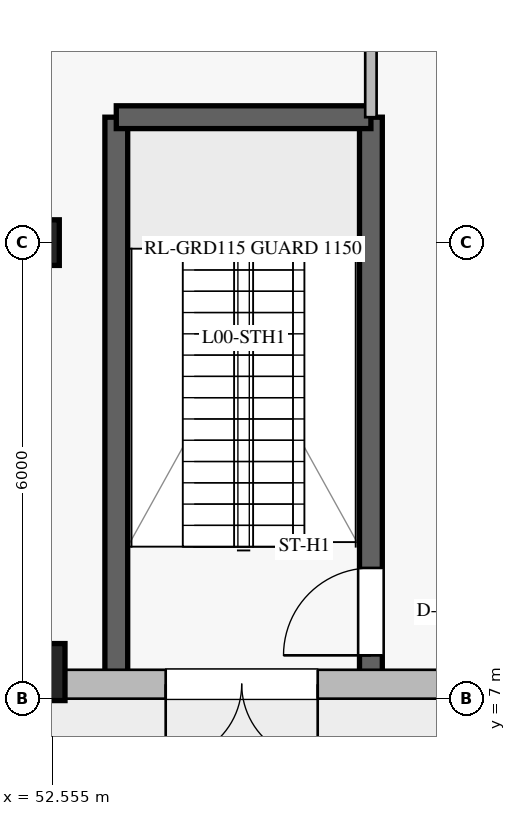
"""IFC4 building model, lengths in metres.
Left out: names, types, materials, properties, quantities, classifications, styles, units other than length and angle.
Written with IfcOpenShell. Run it as: python <this file> out.ifc"""

import sys

from ifc_helpers import new_model, si_unit, direction, frame, frame_2d, origin, origin_2d, place, context, subcontext, project, spatial, rectangle, extrude, element, fill, save


model = new_model("IFC4")
c1 = context("Model", 3, precision=1e-05, world=origin(), true_north=direction((0.0, 1.0)))
c2 = subcontext(c1, "Body", "Model", "MODEL_VIEW")
j1 = project(units=[si_unit("LENGTHUNIT", "METRE"), si_unit("PLANEANGLEUNIT", "RADIAN")], contexts=[c1])
p1 = place(None, origin())
s1 = spatial("IfcSite", under=j1, at=p1, CompositionType="ELEMENT")
p2 = place(p1, origin())
s2 = spatial("IfcBuilding", under=s1, at=p2, CompositionType="ELEMENT")
p3 = place(p2, origin())
s3 = spatial("IfcBuildingStorey", under=s2, at=p3, CompositionType="ELEMENT", Elevation=0.0)
p4 = place(p3, frame((56.75, 7.35, 0.0), z_axis=(0.0, 0.0, 1.0), x_axis=(0.0, 1.0, 0.0)))
e1 = element("IfcWall", 1, at=p4, inside=s3, PredefinedType="SOLIDWALL", context=c2, shape_type="SweptSolid", body=[
    extrude(rectangle(XDim=7.3, YDim=0.3, at=frame_2d((3.65, 0.0))), origin(), (0.0, 0.0, 1.0), 4.94),
])
p5 = place(p4, frame((0.22, 0.0, 0.0)))
e2 = element("IfcOpeningElement", 2, at=p5, cuts=e1, PredefinedType="OPENING", context=c2, shape_type="SweptSolid", body=[
    extrude(rectangle(XDim=1.15, YDim=2.2, at=frame_2d((0.575, 1.1))), frame((0.0, 0.16, 0.0), z_axis=(0.0, -1.0, 0.0), x_axis=(1.0, 0.0, 0.0)), (0.0, 0.0, 1.0), 0.32),
])
p6 = place(p3, frame((53.4, 7.35, 0.0), z_axis=(0.0, 0.0, 1.0), x_axis=(0.0, 1.0, 0.0)))
e3 = element("IfcWall", 3, at=p6, inside=s3, PredefinedType="SOLIDWALL", context=c2, shape_type="SweptSolid", body=[
    extrude(rectangle(XDim=7.3, YDim=0.3, at=frame_2d((3.65, 0.0))), origin(), (0.0, 0.0, 1.0), 4.94),
])
p7 = place(p3, frame((53.4, 14.65, 0.0), z_axis=(0.0, 0.0, 1.0), x_axis=(1.0, 0.0, 0.0)))
e4 = element("IfcWall", 4, at=p7, inside=s3, PredefinedType="SOLIDWALL", context=c2, shape_type="SweptSolid", body=[
    extrude(rectangle(XDim=3.35, YDim=0.3, at=frame_2d((1.675, 0.0))), origin(), (0.0, 0.0, 1.0), 4.94),
])
p8 = place(p3, frame((52.35, 7.35, 0.0), z_axis=(0.0, 0.0, 1.0), x_axis=(1.0, 0.0, 0.0)))
e5 = element("IfcColumn", 5, at=p8, inside=s3, PredefinedType="COLUMN", context=c2, shape_type="SweptSolid", body=[
    extrude(rectangle(XDim=0.75, YDim=0.75, at=origin_2d()), origin(), (0.0, 0.0, 1.0), 5.2),
])
p9 = place(p3, frame((52.35, 13.0, 0.0), z_axis=(0.0, 0.0, 1.0), x_axis=(1.0, 0.0, 0.0)))
e6 = element("IfcColumn", 6, at=p9, inside=s3, PredefinedType="COLUMN", context=c2, shape_type="SweptSolid", body=[
    extrude(rectangle(XDim=0.6, YDim=0.6, at=origin_2d()), origin(), (0.0, 0.0, 1.0), 5.2),
])
p10 = place(p3, frame((75.0, 7.19, 0.0), z_axis=(0.0, 0.0, 1.0), x_axis=(-1.0, 0.0, 0.0)))
e7 = element("IfcWall", 7, at=p10, inside=s3, PredefinedType="STANDARD", context=c2, shape_type="SweptSolid", body=[
    extrude(rectangle(XDim=23.0, YDim=0.38, at=frame_2d((11.5, 0.0))), origin(), (0.0, 0.0, 1.0), 4.94),
])
p11 = place(p10, frame((18.95, 0.0, 0.0)))
e8 = element("IfcOpeningElement", 8, at=p11, cuts=e7, PredefinedType="OPENING", context=c2, shape_type="SweptSolid", body=[
    extrude(rectangle(XDim=2.0, YDim=2.4, at=frame_2d((1.0, 1.2))), frame((0.0, 0.2, 0.0), z_axis=(0.0, -1.0, 0.0), x_axis=(1.0, 0.0, 0.0)), (0.0, 0.0, 1.0), 0.4),
])
p12 = place(p10, frame((10.3, 0.0, 0.95)))
e9 = element("IfcOpeningElement", 9, at=p12, cuts=e7, PredefinedType="OPENING", context=c2, shape_type="SweptSolid", body=[
    extrude(rectangle(XDim=2.4, YDim=1.8, at=frame_2d((1.2, 0.9))), frame((0.0, 0.2, 0.0), z_axis=(0.0, -1.0, 0.0), x_axis=(1.0, 0.0, 0.0)), (0.0, 0.0, 1.0), 0.4),
])
p13 = place(p3, frame((56.75, 14.65, 0.0), z_axis=(0.0, 0.0, 1.0), x_axis=(0.0, 1.0, 0.0)))
e10 = element("IfcWall", 10, at=p13, inside=s3, PredefinedType="PARTITIONING", context=c2, shape_type="SweptSolid", body=[
    extrude(rectangle(XDim=20.7, YDim=0.15, at=frame_2d((10.35, 0.0))), origin(), (0.0, 0.0, 1.0), 4.94),
])
p14 = place(p13, frame((9.675, 0.0, 0.0)))
e11 = element("IfcOpeningElement", 11, at=p14, cuts=e10, PredefinedType="OPENING", context=c2, shape_type="SweptSolid", body=[
    extrude(rectangle(XDim=1.35, YDim=2.2, at=frame_2d((0.675, 1.1))), frame((0.0, 0.085, 0.0), z_axis=(0.0, -1.0, 0.0), x_axis=(1.0, 0.0, 0.0)), (0.0, 0.0, 1.0), 0.17),
])
p15 = place(p11, origin())
e12 = element("IfcDoor", 12, at=p15, inside=s3, OperationType="DOUBLE_DOOR_SINGLE_SWING", PredefinedType="DOOR", context=c2, shape_type="SweptSolid", body=[
    extrude(rectangle(XDim=2.0, YDim=2.4, at=frame_2d((1.0, 1.2))), frame((0.0, 0.025, 0.0), z_axis=(0.0, -1.0, 0.0), x_axis=(1.0, 0.0, 0.0)), (0.0, 0.0, 1.0), 0.05),
])
fill(e8, e12)
p16 = place(p5, origin())
e13 = element("IfcDoor", 13, at=p16, inside=s3, OperationType="SINGLE_SWING_LEFT", PredefinedType="DOOR", context=c2, shape_type="SweptSolid", body=[
    extrude(rectangle(XDim=1.15, YDim=2.2, at=frame_2d((0.575, 1.1))), frame((0.0, 0.025, 0.0), z_axis=(0.0, -1.0, 0.0), x_axis=(1.0, 0.0, 0.0)), (0.0, 0.0, 1.0), 0.05),
])
fill(e2, e13)
save(model, sys.argv[1])
